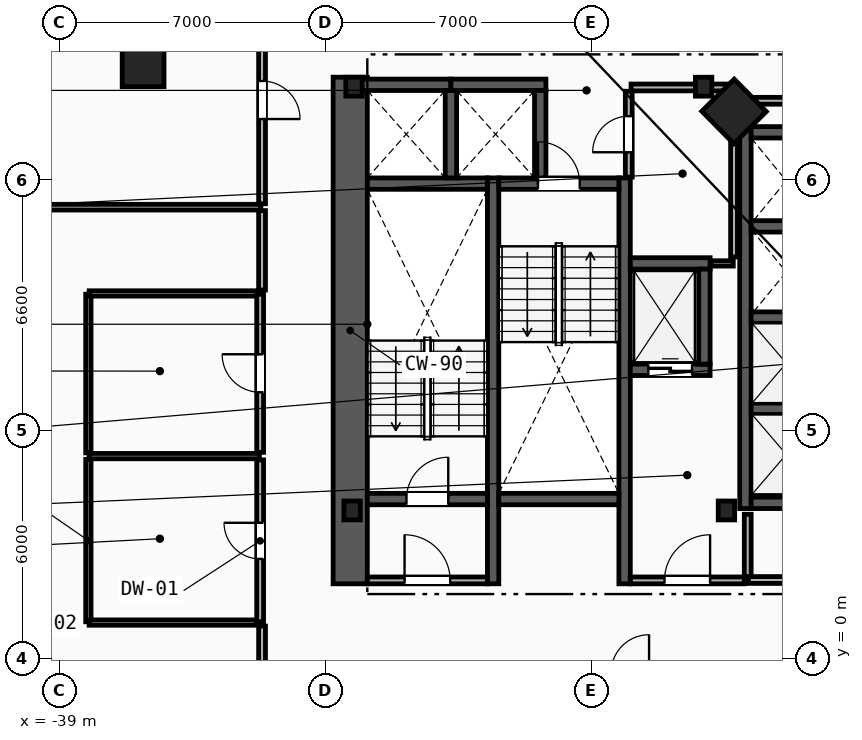
"""IFC4 building model, lengths in metres.
Left out: names, types, materials, properties, quantities, classifications, styles, units other than length and angle.
Written with IfcOpenShell. Run it as: python <this file> out.ifc"""

import sys

from ifc_helpers import new_model, si_unit, direction, frame, frame_2d, origin, origin_2d, place, context, subcontext, project, spatial, rectangle, i_section, extrude, element, fill, save


model = new_model("IFC4")
c1 = context("Model", 3, precision=1e-05, world=origin(), true_north=direction((0.0, 1.0)))
c2 = subcontext(c1, "Body", "Model", "MODEL_VIEW")
j1 = project(units=[si_unit("LENGTHUNIT", "METRE"), si_unit("PLANEANGLEUNIT", "RADIAN")], contexts=[c1])
p1 = place(None, origin())
s1 = spatial("IfcSite", under=j1, at=p1, CompositionType="ELEMENT")
p2 = place(p1, origin())
s2 = spatial("IfcBuilding", under=s1, at=p2, CompositionType="ELEMENT")
p3 = place(p2, frame((0.0, 0.0, 58.2)))
s3 = spatial("IfcBuildingStorey", under=s2, at=p3, CompositionType="ELEMENT", Elevation=58.2)
for number, where, z_axis, x_axis in (
    (1, (-31.3, 3.9, 0.0), (0.0, 0.0, 1.0), (1.0, 0.0, 0.0)),
    (2, (-21.45, 3.9, 0.0), (0.0, 0.0, 1.0), (1.0, 0.0, 0.0)),
    (3, (-22.05, 15.05, 0.0), (0.0, 0.0, 1.0), (1.0, 0.0, 0.0)),
    (4, (-31.25, 15.05, 0.0), (0.0, 0.0, 1.0), (1.0, 0.0, 0.0)),
):
    element("IfcColumn", number, at=place(p3, frame(where, z_axis=z_axis, x_axis=x_axis)), inside=s3, PredefinedType="COLUMN", context=c2, shape_type="SweptSolid", body=[
        extrude(i_section(OverallWidth=0.432, OverallDepth=0.498, WebThickness=0.056, FlangeThickness=0.089, FilletRadius=0.018, at=origin_2d()), origin(), (0.0, 0.0, 1.0), 3.8),
    ])
p4 = place(p3, frame((-36.8, 15.6, 0.0), z_axis=(0.0, 0.0, 1.0), x_axis=(1.0, 0.0, 0.0)))
e5 = element("IfcColumn", 5, at=p4, inside=s3, PredefinedType="COLUMN", context=c2, shape_type="SweptSolid", body=[
    extrude(rectangle(XDim=1.1, YDim=1.1, at=origin_2d()), origin(), (0.0, 0.0, 1.0), 3.8),
])
p5 = place(p3, frame((-21.25, 14.4, 0.0), z_axis=(0.0, 0.0, 1.0), x_axis=(-0.703270634186, 0.710922228581, 0.0)))
e6 = element("IfcColumn", 6, at=p5, inside=s3, PredefinedType="COLUMN", context=c2, shape_type="SweptSolid", body=[
    extrude(rectangle(XDim=1.2, YDim=1.2, at=origin_2d()), origin(), (0.0, 0.0, 1.0), 3.8),
])
p6 = place(p3, frame((-31.35, 1.97, 0.0), z_axis=(0.0, 0.0, 1.0), x_axis=(0.0, 1.0, 0.0)))
e7 = element("IfcWall", 7, at=p6, inside=s3, PredefinedType="SHEAR", context=c2, shape_type="SweptSolid", body=[
    extrude(rectangle(XDim=13.33, YDim=0.9, at=frame_2d((6.665, 0.0))), origin(), (0.0, 0.0, 1.0), 3.5),
])
for number, where, z_axis, x_axis in (
    (8, (-27.59, 1.97, 0.0), (0.0, 0.0, 1.0), (0.0, 1.0, 0.0)),
    (9, (-24.13, 1.97, 0.0), (0.0, 0.0, 1.0), (0.0, 1.0, 0.0)),
):
    element("IfcWall", number, at=place(p3, frame(where, z_axis=z_axis, x_axis=x_axis)), inside=s3, PredefinedType="SHEAR", context=c2, shape_type="SweptSolid", body=[
        extrude(rectangle(XDim=10.68, YDim=0.3, at=frame_2d((5.34, 0.0))), origin(), (0.0, 0.0, 1.0), 3.5),
    ])
p7 = place(p3, frame((-30.9, 4.2, 0.0), z_axis=(0.0, 0.0, 1.0), x_axis=(1.0, 0.0, 0.0)))
e10 = element("IfcWall", 10, at=p7, inside=s3, PredefinedType="SHEAR", context=c2, shape_type="SweptSolid", body=[
    extrude(rectangle(XDim=3.16, YDim=0.3, at=frame_2d((1.58, 0.0))), origin(), (0.0, 0.0, 1.0), 3.5),
])
p8 = place(p7, frame((1.03, 0.0, 0.0)))
e11 = element("IfcOpeningElement", 11, at=p8, cuts=e10, PredefinedType="OPENING", context=c2, shape_type="SweptSolid", body=[
    extrude(rectangle(XDim=1.1, YDim=2.15, at=frame_2d((0.55, 1.075))), frame((0.0, 0.16, 0.0), z_axis=(0.0, -1.0, 0.0), x_axis=(1.0, 0.0, 0.0)), (0.0, 0.0, 1.0), 0.32),
])
p9 = place(p3, frame((-30.9, 12.5, 0.0), z_axis=(0.0, 0.0, 1.0), x_axis=(1.0, 0.0, 0.0)))
e12 = element("IfcWall", 12, at=p9, inside=s3, PredefinedType="SHEAR", context=c2, shape_type="SweptSolid", body=[
    extrude(rectangle(XDim=3.16, YDim=0.3, at=frame_2d((1.58, 0.0))), origin(), (0.0, 0.0, 1.0), 3.5),
])
p10 = place(p3, frame((-27.44, 12.5, 0.0), z_axis=(0.0, 0.0, 1.0), x_axis=(1.0, 0.0, 0.0)))
e13 = element("IfcWall", 13, at=p10, inside=s3, PredefinedType="SHEAR", context=c2, shape_type="SweptSolid", body=[
    extrude(rectangle(XDim=3.16, YDim=0.3, at=frame_2d((1.58, 0.0))), origin(), (0.0, 0.0, 1.0), 3.5),
])
p11 = place(p10, frame((1.03, 0.0, 0.0)))
e14 = element("IfcOpeningElement", 14, at=p11, cuts=e13, PredefinedType="OPENING", context=c2, shape_type="SweptSolid", body=[
    extrude(rectangle(XDim=1.1, YDim=2.15, at=frame_2d((0.55, 1.075))), frame((0.0, 0.16, 0.0), z_axis=(0.0, -1.0, 0.0), x_axis=(1.0, 0.0, 0.0)), (0.0, 0.0, 1.0), 0.32),
])
p12 = place(p3, frame((-27.44, 4.2, 0.0), z_axis=(0.0, 0.0, 1.0), x_axis=(1.0, 0.0, 0.0)))
e15 = element("IfcWall", 15, at=p12, inside=s3, PredefinedType="SHEAR", context=c2, shape_type="SweptSolid", body=[
    extrude(rectangle(XDim=3.16, YDim=0.3, at=frame_2d((1.58, 0.0))), origin(), (0.0, 0.0, 1.0), 3.5),
])
p13 = place(p3, frame((-20.89, 2.15, 0.0), z_axis=(0.0, 0.0, 1.0), x_axis=(0.0, 1.0, 0.0)))
e16 = element("IfcWall", 16, at=p13, inside=s3, PredefinedType="PARTITIONING", context=c2, shape_type="SweptSolid", body=[
    extrude(rectangle(XDim=1.65, YDim=0.18, at=frame_2d((0.825, 0.0))), origin(), (0.0, 0.0, 1.0), 3.5),
])
p14 = place(p3, frame((-23.98, 2.06, 0.0), z_axis=(0.0, 0.0, 1.0), x_axis=(1.0, 0.0, 0.0)))
e17 = element("IfcWall", 17, at=p14, inside=s3, PredefinedType="PARTITIONING", context=c2, shape_type="SweptSolid", body=[
    extrude(rectangle(XDim=3.0, YDim=0.18, at=frame_2d((1.5, 0.0))), origin(), (0.0, 0.0, 1.0), 3.5),
])
p15 = place(p14, frame((0.9, 0.0, 0.0)))
e18 = element("IfcOpeningElement", 18, at=p15, cuts=e17, PredefinedType="OPENING", context=c2, shape_type="SweptSolid", body=[
    extrude(rectangle(XDim=1.2, YDim=2.15, at=frame_2d((0.6, 1.075))), frame((0.0, 0.1, 0.0), z_axis=(0.0, -1.0, 0.0), x_axis=(1.0, 0.0, 0.0)), (0.0, 0.0, 1.0), 0.2),
])
p16 = place(p3, frame((-30.9, 2.06, 0.0), z_axis=(0.0, 0.0, 1.0), x_axis=(1.0, 0.0, 0.0)))
e19 = element("IfcWall", 19, at=p16, inside=s3, PredefinedType="PARTITIONING", context=c2, shape_type="SweptSolid", body=[
    extrude(rectangle(XDim=3.16, YDim=0.18, at=frame_2d((1.58, 0.0))), origin(), (0.0, 0.0, 1.0), 3.5),
])
p17 = place(p16, frame((0.98, 0.0, 0.0)))
e20 = element("IfcOpeningElement", 20, at=p17, cuts=e19, PredefinedType="OPENING", context=c2, shape_type="SweptSolid", body=[
    extrude(rectangle(XDim=1.2, YDim=2.15, at=frame_2d((0.6, 1.075))), frame((0.0, 0.1, 0.0), z_axis=(0.0, -1.0, 0.0), x_axis=(1.0, 0.0, 0.0)), (0.0, 0.0, 1.0), 0.2),
])
p18 = place(p3, frame((-23.98, 7.6, 0.0), z_axis=(0.0, 0.0, 1.0), x_axis=(1.0, 0.0, 0.0)))
e21 = element("IfcWall", 21, at=p18, inside=s3, PredefinedType="SHEAR", context=c2, shape_type="SweptSolid", body=[
    extrude(rectangle(XDim=2.1, YDim=0.3, at=frame_2d((1.05, 0.0))), origin(), (0.0, 0.0, 1.0), 3.5),
])
p19 = place(p18, frame((0.475, 0.0, 0.0)))
e22 = element("IfcOpeningElement", 22, at=p19, cuts=e21, PredefinedType="OPENING", context=c2, shape_type="SweptSolid", body=[
    extrude(rectangle(XDim=1.15, YDim=2.2, at=frame_2d((0.575, 1.1))), frame((0.0, 0.16, 0.0), z_axis=(0.0, -1.0, 0.0), x_axis=(1.0, 0.0, 0.0)), (0.0, 0.0, 1.0), 0.32),
])
p20 = place(p3, frame((-23.98, 10.4, 0.0), z_axis=(0.0, 0.0, 1.0), x_axis=(1.0, 0.0, 0.0)))
e23 = element("IfcWall", 23, at=p20, inside=s3, PredefinedType="SHEAR", context=c2, shape_type="SweptSolid", body=[
    extrude(rectangle(XDim=2.1, YDim=0.3, at=frame_2d((1.05, 0.0))), origin(), (0.0, 0.0, 1.0), 3.5),
])
for number, where, z_axis, x_axis in (
    (24, (-22.03, 7.75, 0.0), (0.0, 0.0, 1.0), (0.0, 1.0, 0.0)),
    (25, (-31.2, 15.1, 0.0), (0.0, 0.0, 1.0), (1.0, 0.0, 0.0)),
):
    element("IfcWall", number, at=place(p3, frame(where, z_axis=z_axis, x_axis=x_axis)), inside=s3, PredefinedType="SHEAR", context=c2, shape_type="SweptSolid", body=[
        extrude(rectangle(XDim=2.5, YDim=0.3, at=frame_2d((1.25, 0.0))), origin(), (0.0, 0.0, 1.0), 3.5),
    ])
p21 = place(p3, frame((-28.7, 12.65, 0.0), z_axis=(0.0, 0.0, 1.0), x_axis=(0.0, 1.0, 0.0)))
e26 = element("IfcWall", 26, at=p21, inside=s3, PredefinedType="SHEAR", context=c2, shape_type="SweptSolid", body=[
    extrude(rectangle(XDim=2.3, YDim=0.3, at=frame_2d((1.15, 0.0))), origin(), (0.0, 0.0, 1.0), 3.5),
])
p22 = place(p3, frame((-28.7, 15.1, 0.0), z_axis=(0.0, 0.0, 1.0), x_axis=(1.0, 0.0, 0.0)))
e27 = element("IfcWall", 27, at=p22, inside=s3, PredefinedType="SHEAR", context=c2, shape_type="SweptSolid", body=[
    extrude(rectangle(XDim=2.5, YDim=0.3, at=frame_2d((1.25, 0.0))), origin(), (0.0, 0.0, 1.0), 3.5),
])
p23 = place(p3, frame((-26.35, 12.65, 0.0), z_axis=(0.0, 0.0, 1.0), x_axis=(0.0, 1.0, 0.0)))
e28 = element("IfcWall", 28, at=p23, inside=s3, PredefinedType="SHEAR", context=c2, shape_type="SweptSolid", body=[
    extrude(rectangle(XDim=2.3, YDim=0.3, at=frame_2d((1.15, 0.0))), origin(), (0.0, 0.0, 1.0), 3.5),
])
p24 = place(p3, frame((-20.95, 3.95, 0.0), z_axis=(0.0, 0.0, 1.0), x_axis=(0.0, 1.0, 0.0)))
e29 = element("IfcWall", 29, at=p24, inside=s3, PredefinedType="SHEAR", context=c2, shape_type="SweptSolid", body=[
    extrude(rectangle(XDim=10.05, YDim=0.3, at=frame_2d((5.025, 0.0))), origin(), (0.0, 0.0, 1.0), 3.5),
])
for number, where, z_axis, x_axis in (
    (30, (-20.8, 4.1, 0.0), (0.0, 0.0, 1.0), (1.0, 0.0, 0.0)),
    (31, (-20.8, 13.85, 0.0), (0.0, 0.0, 1.0), (1.0, 0.0, 0.0)),
):
    element("IfcWall", number, at=place(p3, frame(where, z_axis=z_axis, x_axis=x_axis)), inside=s3, PredefinedType="SHEAR", context=c2, shape_type="SweptSolid", body=[
        extrude(rectangle(XDim=2.15, YDim=0.3, at=frame_2d((1.075, 0.0))), origin(), (0.0, 0.0, 1.0), 3.5),
    ])
for number, where, z_axis, x_axis in (
    (32, (-20.8, 6.575, 0.0), (0.0, 0.0, 1.0), (1.0, 0.0, 0.0)),
    (33, (-20.8, 8.975, 0.0), (0.0, 0.0, 1.0), (1.0, 0.0, 0.0)),
    (34, (-20.8, 11.375, 0.0), (0.0, 0.0, 1.0), (1.0, 0.0, 0.0)),
):
    element("IfcWall", number, at=place(p3, frame(where, z_axis=z_axis, x_axis=x_axis)), inside=s3, PredefinedType="SHEAR", context=c2, shape_type="SweptSolid", body=[
        extrude(rectangle(XDim=1.85, YDim=0.3, at=frame_2d((0.925, 0.0))), origin(), (0.0, 0.0, 1.0), 3.5),
    ])
p25 = place(p3, frame((-20.87, 2.07, 0.0), z_axis=(0.0, 0.0, 1.0), x_axis=(1.0, 0.0, 0.0)))
e35 = element("IfcWall", 35, at=p25, inside=s3, PredefinedType="PARTITIONING", context=c2, shape_type="SweptSolid", body=[
    extrude(rectangle(XDim=3.83, YDim=0.18, at=frame_2d((1.915, 0.0))), origin(), (0.0, 0.0, 1.0), 3.5),
])
p26 = place(p25, frame((1.44, 0.0, 0.0)))
e36 = element("IfcOpeningElement", 36, at=p26, cuts=e35, PredefinedType="OPENING", context=c2, shape_type="SweptSolid", body=[
    extrude(rectangle(XDim=0.95, YDim=2.1, at=frame_2d((0.475, 1.05))), frame((0.0, 0.1, 0.0), z_axis=(0.0, -1.0, 0.0), x_axis=(1.0, 0.0, 0.0)), (0.0, 0.0, 1.0), 0.2),
])
p27 = place(p3, frame((-21.86, 10.4, 0.0), z_axis=(0.0, 0.0, 1.0), x_axis=(1.0, 0.0, 0.0)))
e37 = element("IfcWall", 37, at=p27, inside=s3, PredefinedType="PARTITIONING", context=c2, shape_type="SweptSolid", body=[
    extrude(rectangle(XDim=0.59, YDim=0.14, at=frame_2d((0.295, 0.0))), origin(), (0.0, 0.0, 1.0), 3.5),
])
p28 = place(p3, frame((-21.25, 10.57, 0.0), z_axis=(0.0, 0.0, 1.0), x_axis=(0.0, 1.0, 0.0)))
e38 = element("IfcWall", 38, at=p28, inside=s3, PredefinedType="PARTITIONING", context=c2, shape_type="SweptSolid", body=[
    extrude(rectangle(XDim=4.36, YDim=0.18, at=frame_2d((2.18, 0.0))), origin(), (0.0, 0.0, 1.0), 3.5),
])
p29 = place(p3, frame((-23.96, 15.03, 0.0), z_axis=(0.0, 0.0, 1.0), x_axis=(1.0, 0.0, 0.0)))
e39 = element("IfcWall", 39, at=p29, inside=s3, PredefinedType="PARTITIONING", context=c2, shape_type="SweptSolid", body=[
    extrude(rectangle(XDim=2.61, YDim=0.18, at=frame_2d((1.305, 0.0))), origin(), (0.0, 0.0, 1.0), 2.573),
])
p30 = place(p3, frame((-24.02, 12.67, 0.0), z_axis=(0.0, 0.0, 1.0), x_axis=(0.0, 1.0, 0.0)))
e40 = element("IfcWall", 40, at=p30, inside=s3, PredefinedType="PARTITIONING", context=c2, shape_type="SweptSolid", body=[
    extrude(rectangle(XDim=2.26, YDim=0.18, at=frame_2d((1.13, 0.0))), origin(), (0.0, 0.0, 1.0), 3.5),
])
p31 = place(p30, frame((0.655, 0.0, 0.0)))
e41 = element("IfcOpeningElement", 41, at=p31, cuts=e40, PredefinedType="OPENING", context=c2, shape_type="SweptSolid", body=[
    extrude(rectangle(XDim=0.95, YDim=2.1, at=frame_2d((0.475, 1.05))), frame((0.0, 0.1, 0.0), z_axis=(0.0, -1.0, 0.0), x_axis=(1.0, 0.0, 0.0)), (0.0, 0.0, 1.0), 0.2),
])
p32 = place(p3, frame((-38.24, 0.97, 0.0), z_axis=(0.0, 0.0, 1.0), x_axis=(0.0, 1.0, 0.0)))
e42 = element("IfcWall", 42, at=p32, inside=s3, PredefinedType="PARTITIONING", context=c2, shape_type="SweptSolid", body=[
    extrude(rectangle(XDim=4.275, YDim=0.14, at=frame_2d((2.138, 0.0))), origin(), (0.0, 0.0, 1.0), 3.5),
])
p33 = place(p3, frame((-38.24, 5.415, 0.0), z_axis=(0.0, 0.0, 1.0), x_axis=(0.0, 1.0, 0.0)))
e43 = element("IfcWall", 43, at=p33, inside=s3, PredefinedType="PARTITIONING", context=c2, shape_type="SweptSolid", body=[
    extrude(rectangle(XDim=4.175, YDim=0.14, at=frame_2d((2.087, 0.0))), origin(), (0.0, 0.0, 1.0), 3.5),
])
for number, where, z_axis, x_axis in (
    (44, (-38.22, 0.95, 0.0), (0.0, 0.0, 1.0), (1.0, 0.0, 0.0)),
    (45, (-38.22, 5.33, 0.0), (0.0, 0.0, 1.0), (1.0, 0.0, 0.0)),
    (46, (-38.22, 9.61, 0.0), (0.0, 0.0, 1.0), (1.0, 0.0, 0.0)),
):
    element("IfcWall", number, at=place(p3, frame(where, z_axis=z_axis, x_axis=x_axis)), inside=s3, PredefinedType="PARTITIONING", context=c2, shape_type="SweptSolid", body=[
        extrude(rectangle(XDim=4.48, YDim=0.14, at=frame_2d((2.24, 0.0))), origin(), (0.0, 0.0, 1.0), 3.5),
    ])
p34 = place(p3, frame((-33.72, 0.97, 0.0), z_axis=(0.0, 0.0, 1.0), x_axis=(0.0, 1.0, 0.0)))
e47 = element("IfcWall", 47, at=p34, inside=s3, PredefinedType="PARTITIONING", context=c2, shape_type="SweptSolid", body=[
    extrude(rectangle(XDim=4.26, YDim=0.18, at=frame_2d((2.13, 0.0))), origin(), (0.0, 0.0, 1.0), 3.5),
])
p35 = place(p34, frame((1.655, 0.0, 0.0)))
e48 = element("IfcOpeningElement", 48, at=p35, cuts=e47, PredefinedType="OPENING", context=c2, shape_type="SweptSolid", body=[
    extrude(rectangle(XDim=0.95, YDim=2.1, at=frame_2d((0.475, 1.05))), frame((0.0, 0.1, 0.0), z_axis=(0.0, -1.0, 0.0), x_axis=(1.0, 0.0, 0.0)), (0.0, 0.0, 1.0), 0.2),
])
p36 = place(p3, frame((-33.72, 5.43, 0.0), z_axis=(0.0, 0.0, 1.0), x_axis=(0.0, 1.0, 0.0)))
e49 = element("IfcWall", 49, at=p36, inside=s3, PredefinedType="PARTITIONING", context=c2, shape_type="SweptSolid", body=[
    extrude(rectangle(XDim=4.16, YDim=0.18, at=frame_2d((2.08, 0.0))), origin(), (0.0, 0.0, 1.0), 3.5),
])
p37 = place(p36, frame((1.58, 0.0, 0.0)))
e50 = element("IfcOpeningElement", 50, at=p37, cuts=e49, PredefinedType="OPENING", context=c2, shape_type="SweptSolid", body=[
    extrude(rectangle(XDim=1.0, YDim=2.15, at=frame_2d((0.5, 1.075))), frame((0.0, 0.1, 0.0), z_axis=(0.0, -1.0, 0.0), x_axis=(1.0, 0.0, 0.0)), (0.0, 0.0, 1.0), 0.2),
])
p38 = place(p3, frame((-50.141, 11.88, 0.0), z_axis=(0.0, 0.0, 1.0), x_axis=(1.0, 0.0, 0.0)))
e51 = element("IfcWall", 51, at=p38, inside=s3, PredefinedType="PARTITIONING", context=c2, shape_type="SweptSolid", body=[
    extrude(rectangle(XDim=16.441, YDim=0.15, at=frame_2d((8.22, 0.0))), origin(), (0.0, 0.0, 1.0), 3.5),
])
p39 = place(p3, frame((-33.67, 0.859, 0.0), z_axis=(0.0, 0.0, 1.0), x_axis=(0.0, -1.0, 0.0)))
e52 = element("IfcWall", 52, at=p39, inside=s3, PredefinedType="PARTITIONING", context=c2, shape_type="SweptSolid", body=[
    extrude(rectangle(XDim=6.629, YDim=0.18, at=frame_2d((3.314, 0.0))), origin(), (0.0, 0.0, 1.0), 3.5),
])
p40 = place(p39, frame((2.814, 0.0, 0.0)))
e53 = element("IfcOpeningElement", 53, at=p40, cuts=e52, PredefinedType="OPENING", context=c2, shape_type="SweptSolid", body=[
    extrude(rectangle(XDim=1.0, YDim=2.15, at=frame_2d((0.5, 1.075))), frame((0.0, 0.1, 0.0), z_axis=(0.0, -1.0, 0.0), x_axis=(1.0, 0.0, 0.0)), (0.0, 0.0, 1.0), 0.2),
])
p41 = place(p3, frame((-33.67, 11.79, 0.0), z_axis=(0.0, 0.0, 1.0), x_axis=(0.0, -1.0, 0.0)))
e54 = element("IfcWall", 54, at=p41, inside=s3, PredefinedType="PARTITIONING", context=c2, shape_type="SweptSolid", body=[
    extrude(rectangle(XDim=2.089, YDim=0.18, at=frame_2d((1.044, 0.0))), origin(), (0.0, 0.0, 1.0), 3.5),
])
p42 = place(p3, frame((-21.178, 14.68, 0.0), z_axis=(0.0, 0.0, 1.0), x_axis=(1.0, 0.0, 0.0)))
e55 = element("IfcWall", 55, at=p42, inside=s3, PredefinedType="PARTITIONING", context=c2, shape_type="SweptSolid", body=[
    extrude(rectangle(XDim=4.357, YDim=0.18, at=frame_2d((2.178, 0.0))), origin(), (0.0, 0.0, 1.0), 3.5),
])
p43 = place(p3, frame((-33.67, 17.428, 0.0), z_axis=(0.0, 0.0, 1.0), x_axis=(0.0, -1.0, 0.0)))
e56 = element("IfcWall", 56, at=p43, inside=s3, PredefinedType="PARTITIONING", context=c2, shape_type="SweptSolid", body=[
    extrude(rectangle(XDim=5.458, YDim=0.18, at=frame_2d((2.729, 0.0))), origin(), (0.0, 0.0, 1.0), 3.5),
])
p44 = place(p43, frame((2.229, 0.0, 0.0)))
e57 = element("IfcOpeningElement", 57, at=p44, cuts=e56, PredefinedType="OPENING", context=c2, shape_type="SweptSolid", body=[
    extrude(rectangle(XDim=1.0, YDim=2.15, at=frame_2d((0.5, 1.075))), frame((0.0, 0.1, 0.0), z_axis=(0.0, -1.0, 0.0), x_axis=(1.0, 0.0, 0.0)), (0.0, 0.0, 1.0), 0.2),
])
p45 = place(p8, origin())
e58 = element("IfcDoor", 58, at=p45, inside=s3, OperationType="SINGLE_SWING_RIGHT", PredefinedType="DOOR", context=c2, shape_type="SweptSolid", body=[
    extrude(rectangle(XDim=1.1, YDim=2.15, at=frame_2d((0.55, 1.075))), frame((0.0, 0.025, 0.0), z_axis=(0.0, -1.0, 0.0), x_axis=(1.0, 0.0, 0.0)), (0.0, 0.0, 1.0), 0.05),
])
fill(e11, e58)
p46 = place(p11, origin())
e59 = element("IfcDoor", 59, at=p46, inside=s3, OperationType="SINGLE_SWING_LEFT", PredefinedType="DOOR", context=c2, shape_type="SweptSolid", body=[
    extrude(rectangle(XDim=1.1, YDim=2.15, at=frame_2d((0.55, 1.075))), frame((0.0, 0.025, 0.0), z_axis=(0.0, -1.0, 0.0), x_axis=(1.0, 0.0, 0.0)), (0.0, 0.0, 1.0), 0.05),
])
fill(e14, e59)
p47 = place(p15, origin())
e60 = element("IfcDoor", 60, at=p47, inside=s3, OperationType="SINGLE_SWING_RIGHT", PredefinedType="DOOR", context=c2, shape_type="SweptSolid", body=[
    extrude(rectangle(XDim=1.2, YDim=2.15, at=frame_2d((0.6, 1.075))), frame((0.0, 0.025, 0.0), z_axis=(0.0, -1.0, 0.0), x_axis=(1.0, 0.0, 0.0)), (0.0, 0.0, 1.0), 0.05),
])
fill(e18, e60)
p48 = place(p17, origin())
e61 = element("IfcDoor", 61, at=p48, inside=s3, OperationType="SINGLE_SWING_LEFT", PredefinedType="DOOR", context=c2, shape_type="SweptSolid", body=[
    extrude(rectangle(XDim=1.2, YDim=2.15, at=frame_2d((0.6, 1.075))), frame((0.0, 0.025, 0.0), z_axis=(0.0, -1.0, 0.0), x_axis=(1.0, 0.0, 0.0)), (0.0, 0.0, 1.0), 0.05),
])
fill(e20, e61)
p49 = place(p19, origin())
e62 = element("IfcDoor", 62, at=p49, inside=s3, OperationType="SLIDING_TO_LEFT", PredefinedType="TRAPDOOR", context=c2, shape_type="SweptSolid", body=[
    extrude(rectangle(XDim=1.15, YDim=2.2, at=frame_2d((0.575, 1.1))), frame((0.0, 0.025, 0.0), z_axis=(0.0, -1.0, 0.0), x_axis=(1.0, 0.0, 0.0)), (0.0, 0.0, 1.0), 0.05),
])
fill(e22, e62)
p50 = place(p44, origin())
e63 = element("IfcDoor", 63, at=p50, inside=s3, OperationType="SINGLE_SWING_RIGHT", PredefinedType="DOOR", context=c2, shape_type="SweptSolid", body=[
    extrude(rectangle(XDim=1.0, YDim=2.15, at=frame_2d((0.5, 1.075))), frame((0.0, 0.025, 0.0), z_axis=(0.0, -1.0, 0.0), x_axis=(1.0, 0.0, 0.0)), (0.0, 0.0, 1.0), 0.05),
])
fill(e57, e63)
p51 = place(p35, origin())
e64 = element("IfcDoor", 64, at=p51, inside=s3, OperationType="SINGLE_SWING_RIGHT", PredefinedType="DOOR", context=c2, shape_type="SweptSolid", body=[
    extrude(rectangle(XDim=0.95, YDim=2.1, at=frame_2d((0.475, 1.05))), frame((0.0, 0.025, 0.0), z_axis=(0.0, -1.0, 0.0), x_axis=(1.0, 0.0, 0.0)), (0.0, 0.0, 1.0), 0.05),
])
fill(e48, e64)
p52 = place(p37, origin())
e65 = element("IfcDoor", 65, at=p52, inside=s3, OperationType="SINGLE_SWING_RIGHT", PredefinedType="DOOR", context=c2, shape_type="SweptSolid", body=[
    extrude(rectangle(XDim=1.0, YDim=2.15, at=frame_2d((0.5, 1.075))), frame((0.0, 0.025, 0.0), z_axis=(0.0, -1.0, 0.0), x_axis=(1.0, 0.0, 0.0)), (0.0, 0.0, 1.0), 0.05),
])
fill(e50, e65)
p53 = place(p31, origin())
e66 = element("IfcDoor", 66, at=p53, inside=s3, OperationType="SINGLE_SWING_LEFT", PredefinedType="DOOR", context=c2, shape_type="SweptSolid", body=[
    extrude(rectangle(XDim=0.95, YDim=2.1, at=frame_2d((0.475, 1.05))), frame((0.0, 0.025, 0.0), z_axis=(0.0, -1.0, 0.0), x_axis=(1.0, 0.0, 0.0)), (0.0, 0.0, 1.0), 0.05),
])
fill(e41, e66)
save(model, sys.argv[1])
